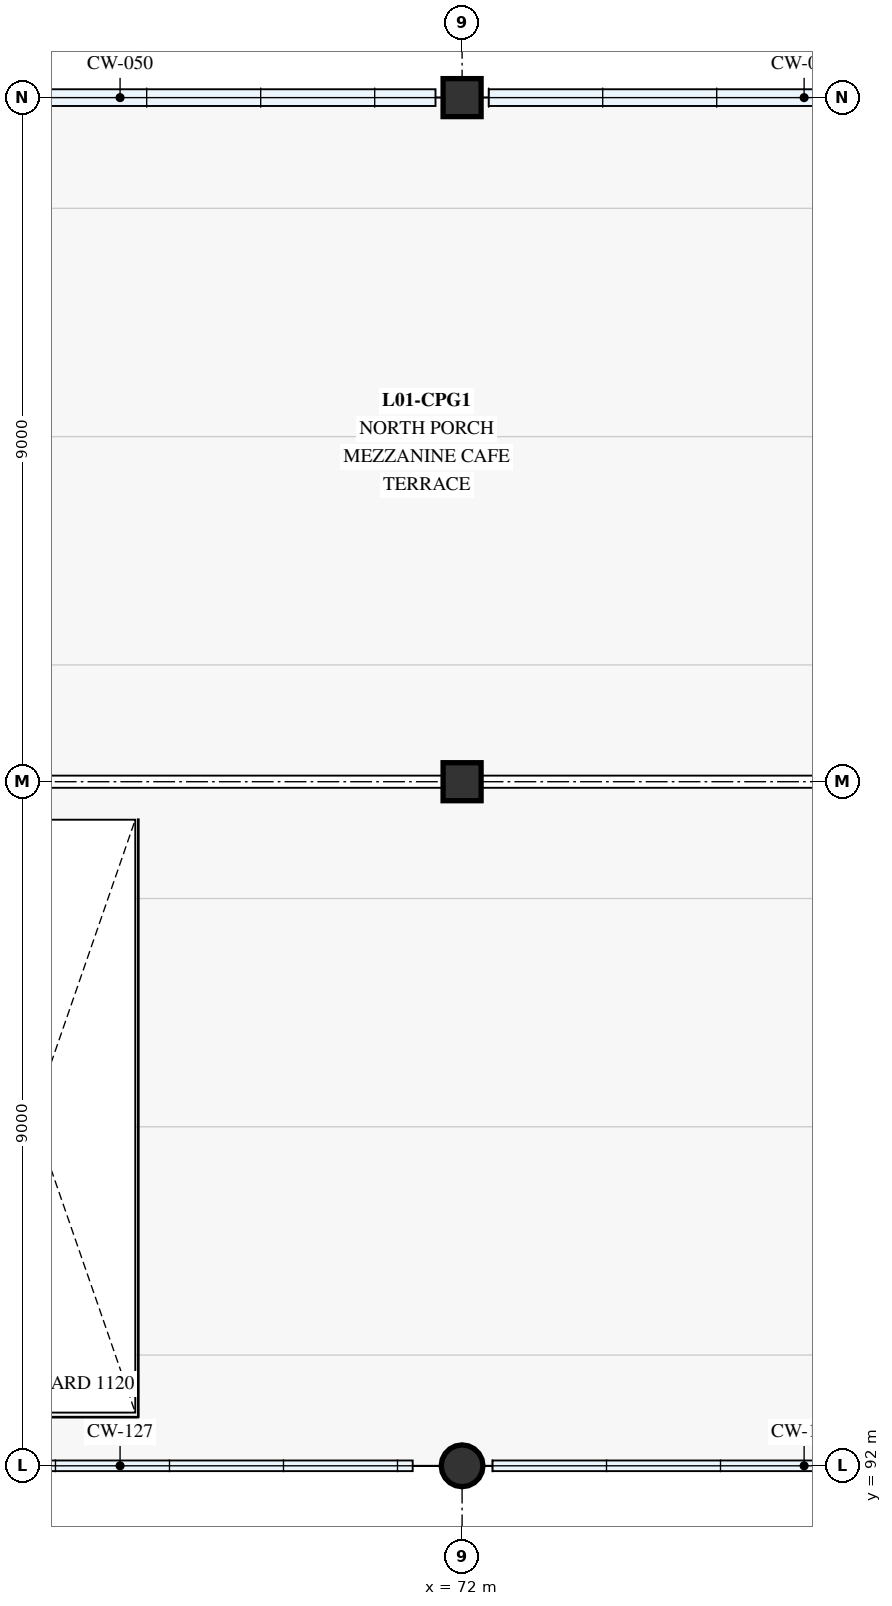
"""IFC4 building model, lengths in metres.
Left out: names, types, materials, properties, quantities, classifications, styles, units other than length and angle.
Written with IfcOpenShell. Run it as: python <this file> out.ifc"""

import sys

from ifc_helpers import new_model, si_unit, direction, frame, origin, origin_2d, place, context, subcontext, project, spatial, rectangle, circle, extrude, element, save


model = new_model("IFC4")
c1 = context("Model", 3, precision=1e-05, world=origin(), true_north=direction((0.0, 1.0)))
c2 = subcontext(c1, "Body", "Model", "MODEL_VIEW")
j1 = project(units=[si_unit("LENGTHUNIT", "METRE"), si_unit("PLANEANGLEUNIT", "RADIAN")], contexts=[c1])
p1 = place(None, origin())
s1 = spatial("IfcSite", under=j1, at=p1, CompositionType="ELEMENT")
p2 = place(p1, origin())
s2 = spatial("IfcBuilding", under=s1, at=p2, CompositionType="ELEMENT")
p3 = place(p2, frame((0.0, 0.0, 4.5)))
s3 = spatial("IfcBuildingStorey", under=s2, at=p3, CompositionType="ELEMENT", Elevation=4.5)
p4 = place(p3, frame((72.0, 92.0, 0.0), z_axis=(0.0, 0.0, 1.0), x_axis=(1.0, 0.0, 0.0)))
e1 = element("IfcColumn", 1, at=p4, inside=s3, PredefinedType="COLUMN", context=c2, shape_type="SweptSolid", body=[
    extrude(circle(Radius=0.275, at=origin_2d()), origin(), (0.0, 0.0, 1.0), 3.9),
])
p5 = place(p3, frame((72.0, 101.0, 0.0), z_axis=(0.0, 0.0, 1.0), x_axis=(1.0, 0.0, 0.0)))
e2 = element("IfcColumn", 2, at=p5, inside=s3, PredefinedType="COLUMN", context=c2, shape_type="SweptSolid", body=[
    extrude(rectangle(XDim=0.5, YDim=0.5, at=origin_2d()), origin(), (0.0, 0.0, 1.0), 5.71),
])
p6 = place(p3, frame((72.0, 110.0, 0.0), z_axis=(0.0, 0.0, 1.0), x_axis=(1.0, 0.0, 0.0)))
e3 = element("IfcColumn", 3, at=p6, inside=s3, PredefinedType="COLUMN", context=c2, shape_type="SweptSolid", body=[
    extrude(rectangle(XDim=0.5, YDim=0.5, at=origin_2d()), origin(), (0.0, 0.0, 1.0), 3.71),
])
save(model, sys.argv[1])
